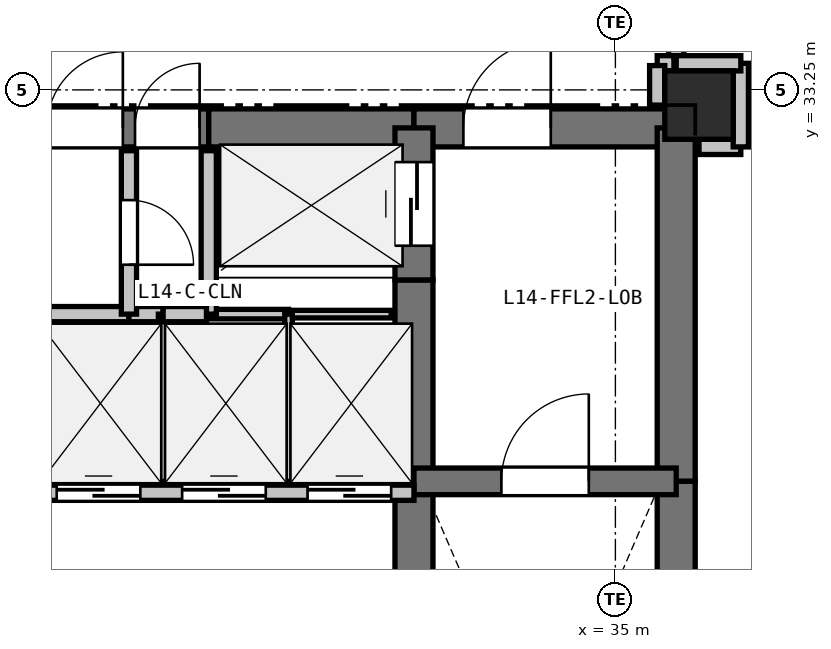
"""IFC4 building model, lengths in metres.
Left out: names, types, materials, properties, quantities, classifications, styles, units other than length and angle.
Written with IfcOpenShell. Run it as: python <this file> out.ifc"""

import sys

from ifc_helpers import new_model, si_unit, direction, frame, frame_2d, origin, origin_2d, place, context, subcontext, project, spatial, rectangle, extrude, element, fill, save


model = new_model("IFC4")
c1 = context("Model", 3, precision=1e-05, world=origin(), true_north=direction((0.0, 1.0)))
c2 = subcontext(c1, "Body", "Model", "MODEL_VIEW")
j1 = project(units=[si_unit("LENGTHUNIT", "METRE"), si_unit("PLANEANGLEUNIT", "RADIAN")], contexts=[c1])
p1 = place(None, origin())
s1 = spatial("IfcSite", under=j1, at=p1, CompositionType="ELEMENT")
p2 = place(p1, origin())
s2 = spatial("IfcBuilding", under=s1, at=p2, CompositionType="ELEMENT")
p3 = place(p2, frame((0.0, 0.0, 52.2)))
s3 = spatial("IfcBuildingStorey", under=s2, at=p3, CompositionType="ELEMENT", Elevation=52.2)
p4 = place(p3, frame((36.1, 33.05, 0.0), z_axis=(0.0, 0.0, 1.0), x_axis=(1.0, 0.0, 0.0)))
e1 = element("IfcColumn", 1, at=p4, inside=s3, PredefinedType="COLUMN", context=c2, shape_type="SweptSolid", body=[
    extrude(rectangle(XDim=0.9, YDim=0.9, at=origin_2d()), origin(), (0.0, 0.0, 1.0), 3.3),
])
p5 = place(p3, frame((27.4, 32.75, 0.0), z_axis=(0.0, 0.0, 1.0), x_axis=(1.0, 0.0, 0.0)))
e2 = element("IfcWall", 2, at=p5, inside=s3, PredefinedType="SHEAR", context=c2, shape_type="SweptSolid", body=[
    extrude(rectangle(XDim=2.25, YDim=0.5, at=frame_2d((1.125, 0.0))), origin(), (0.0, 0.0, 1.0), 3.04),
])
p6 = place(p5, frame((0.12, 0.0, 0.0)))
e3 = element("IfcOpeningElement", 3, at=p6, cuts=e2, PredefinedType="OPENING", context=c2, shape_type="SweptSolid", body=[
    extrude(rectangle(XDim=1.0, YDim=2.15, at=frame_2d((0.5, 1.075))), frame((0.0, 0.26, 0.0), z_axis=(0.0, -1.0, 0.0), x_axis=(1.0, 0.0, 0.0)), (0.0, 0.0, 1.0), 0.52),
])
p7 = place(p5, frame((1.28, 0.0, 0.0)))
e4 = element("IfcOpeningElement", 4, at=p7, cuts=e2, PredefinedType="OPENING", context=c2, shape_type="SweptSolid", body=[
    extrude(rectangle(XDim=0.85, YDim=2.1, at=frame_2d((0.425, 1.05))), frame((0.0, 0.26, 0.0), z_axis=(0.0, -1.0, 0.0), x_axis=(1.0, 0.0, 0.0)), (0.0, 0.0, 1.0), 0.52),
])
p8 = place(p3, frame((29.65, 32.75, 0.0), z_axis=(0.0, 0.0, 1.0), x_axis=(1.0, 0.0, 0.0)))
e5 = element("IfcWall", 5, at=p8, inside=s3, PredefinedType="SHEAR", context=c2, shape_type="SweptSolid", body=[
    extrude(rectangle(XDim=2.7, YDim=0.5, at=frame_2d((1.35, 0.0))), origin(), (0.0, 0.0, 1.0), 3.04),
])
p9 = place(p3, frame((32.35, 32.75, 0.0), z_axis=(0.0, 0.0, 1.0), x_axis=(1.0, 0.0, 0.0)))
e6 = element("IfcWall", 6, at=p9, inside=s3, PredefinedType="SHEAR", context=c2, shape_type="SweptSolid", body=[
    extrude(rectangle(XDim=3.45, YDim=0.5, at=frame_2d((1.725, 0.0))), origin(), (0.0, 0.0, 1.0), 3.04),
])
p10 = place(p9, frame((0.65, 0.0, 0.0)))
e7 = element("IfcOpeningElement", 7, at=p10, cuts=e6, PredefinedType="OPENING", context=c2, shape_type="SweptSolid", body=[
    extrude(rectangle(XDim=1.15, YDim=2.15, at=frame_2d((0.575, 1.075))), frame((0.0, 0.26, 0.0), z_axis=(0.0, -1.0, 0.0), x_axis=(1.0, 0.0, 0.0)), (0.0, 0.0, 1.0), 0.52),
])
p11 = place(p3, frame((35.8, 32.75, 0.0), z_axis=(0.0, 0.0, 1.0), x_axis=(0.0, -1.0, 0.0)))
e8 = element("IfcWall", 8, at=p11, inside=s3, PredefinedType="SHEAR", context=c2, shape_type="SweptSolid", body=[
    extrude(rectangle(XDim=4.65, YDim=0.5, at=frame_2d((2.325, 0.0))), origin(), (0.0, 0.0, 1.0), 3.04),
])
p12 = place(p3, frame((35.8, 28.1, 0.0), z_axis=(0.0, 0.0, 1.0), x_axis=(0.0, -1.0, 0.0)))
e9 = element("IfcWall", 9, at=p12, inside=s3, PredefinedType="SHEAR", context=c2, shape_type="SweptSolid", body=[
    extrude(rectangle(XDim=7.35, YDim=0.5, at=frame_2d((3.675, 0.0))), origin(), (0.0, 0.0, 1.0), 3.04),
])
p13 = place(p3, frame((32.35, 25.55, 0.0), z_axis=(0.0, 0.0, 1.0), x_axis=(0.0, 1.0, 0.0)))
e10 = element("IfcWall", 10, at=p13, inside=s3, PredefinedType="SHEAR", context=c2, shape_type="SweptSolid", body=[
    extrude(rectangle(XDim=2.4, YDim=0.5, at=frame_2d((1.2, 0.0))), origin(), (0.0, 0.0, 1.0), 3.04),
])
p14 = place(p3, frame((32.35, 27.95, 0.0), z_axis=(0.0, 0.0, 1.0), x_axis=(0.0, 1.0, 0.0)))
e11 = element("IfcWall", 11, at=p14, inside=s3, PredefinedType="SHEAR", context=c2, shape_type="SweptSolid", body=[
    extrude(rectangle(XDim=2.8, YDim=0.5, at=frame_2d((1.4, 0.0))), origin(), (0.0, 0.0, 1.0), 3.04),
])
p15 = place(p3, frame((32.35, 30.75, 0.0), z_axis=(0.0, 0.0, 1.0), x_axis=(0.0, 1.0, 0.0)))
e12 = element("IfcWall", 12, at=p15, inside=s3, PredefinedType="SHEAR", context=c2, shape_type="SweptSolid", body=[
    extrude(rectangle(XDim=2.0, YDim=0.5, at=frame_2d((1.0, 0.0))), origin(), (0.0, 0.0, 1.0), 3.04),
])
p16 = place(p15, frame((0.45, 0.0, 0.0)))
e13 = element("IfcOpeningElement", 13, at=p16, cuts=e12, PredefinedType="OPENING", context=c2, shape_type="SweptSolid", body=[
    extrude(rectangle(XDim=1.1, YDim=2.15, at=frame_2d((0.55, 1.075))), frame((0.0, 0.26, 0.0), z_axis=(0.0, -1.0, 0.0), x_axis=(1.0, 0.0, 0.0)), (0.0, 0.0, 1.0), 0.52),
])
p17 = place(p3, frame((32.35, 28.1, 0.0), z_axis=(0.0, 0.0, 1.0), x_axis=(1.0, 0.0, 0.0)))
e14 = element("IfcWall", 14, at=p17, inside=s3, PredefinedType="SHEAR", context=c2, shape_type="SweptSolid", body=[
    extrude(rectangle(XDim=3.45, YDim=0.35, at=frame_2d((1.725, 0.0))), origin(), (0.0, 0.0, 1.0), 3.04),
])
p18 = place(p17, frame((1.15, 0.0, 0.0)))
e15 = element("IfcOpeningElement", 15, at=p18, cuts=e14, PredefinedType="OPENING", context=c2, shape_type="SweptSolid", body=[
    extrude(rectangle(XDim=1.15, YDim=2.15, at=frame_2d((0.575, 1.075))), frame((0.0, 0.185, 0.0), z_axis=(0.0, -1.0, 0.0), x_axis=(1.0, 0.0, 0.0)), (0.0, 0.0, 1.0), 0.37),
])
p19 = place(p3, frame((27.4, 27.95, 0.0), z_axis=(0.0, 0.0, 1.0), x_axis=(1.0, 0.0, 0.0)))
e16 = element("IfcWall", 16, at=p19, inside=s3, PredefinedType="PARTITIONING", context=c2, shape_type="SweptSolid", body=[
    extrude(rectangle(XDim=4.95, YDim=0.2, at=frame_2d((2.475, 0.0))), origin(), (0.0, 0.0, 1.0), 3.04),
])
p20 = place(p19, frame((0.25, 0.0, 0.0)))
e17 = element("IfcOpeningElement", 17, at=p20, cuts=e16, PredefinedType="OPENING", context=c2, shape_type="SweptSolid", body=[
    extrude(rectangle(XDim=1.1, YDim=2.15, at=frame_2d((0.55, 1.075))), frame((0.0, 0.11, 0.0), z_axis=(0.0, -1.0, 0.0), x_axis=(1.0, 0.0, 0.0)), (0.0, 0.0, 1.0), 0.22),
])
p21 = place(p19, frame((1.9, 0.0, 0.0)))
e18 = element("IfcOpeningElement", 18, at=p21, cuts=e16, PredefinedType="OPENING", context=c2, shape_type="SweptSolid", body=[
    extrude(rectangle(XDim=1.1, YDim=2.15, at=frame_2d((0.55, 1.075))), frame((0.0, 0.11, 0.0), z_axis=(0.0, -1.0, 0.0), x_axis=(1.0, 0.0, 0.0)), (0.0, 0.0, 1.0), 0.22),
])
p22 = place(p19, frame((3.55, 0.0, 0.0)))
e19 = element("IfcOpeningElement", 19, at=p22, cuts=e16, PredefinedType="OPENING", context=c2, shape_type="SweptSolid", body=[
    extrude(rectangle(XDim=1.1, YDim=2.15, at=frame_2d((0.55, 1.075))), frame((0.0, 0.11, 0.0), z_axis=(0.0, -1.0, 0.0), x_axis=(1.0, 0.0, 0.0)), (0.0, 0.0, 1.0), 0.22),
])
p23 = place(p3, frame((32.05, 30.3, 0.0), z_axis=(0.0, 0.0, 1.0), x_axis=(-1.0, 0.0, 0.0)))
e20 = element("IfcWall", 20, at=p23, inside=s3, PredefinedType="PARTITIONING", context=c2, shape_type="SweptSolid", body=[
    extrude(rectangle(XDim=1.35, YDim=0.1, at=frame_2d((0.675, 0.0))), origin(), (0.0, 0.0, 1.0), 3.04),
])
p24 = place(p3, frame((30.7, 30.3, 0.0), z_axis=(0.0, 0.0, 1.0), x_axis=(-1.0, 0.0, 0.0)))
e21 = element("IfcWall", 21, at=p24, inside=s3, PredefinedType="PARTITIONING", context=c2, shape_type="SweptSolid", body=[
    extrude(rectangle(XDim=1.05, YDim=0.125, at=frame_2d((0.525, 0.0))), origin(), (0.0, 0.0, 1.0), 3.04),
])
p25 = place(p3, frame((29.65, 30.3, 0.0), z_axis=(0.0, 0.0, 1.0), x_axis=(0.0, 1.0, 0.0)))
e22 = element("IfcWall", 22, at=p25, inside=s3, PredefinedType="PARTITIONING", context=c2, shape_type="SweptSolid", body=[
    extrude(rectangle(XDim=2.15, YDim=0.2, at=frame_2d((1.075, 0.0))), origin(), (0.0, 0.0, 1.0), 3.04),
])
p26 = place(p3, frame((27.4, 30.3, 0.0), z_axis=(0.0, 0.0, 1.0), x_axis=(1.0, 0.0, 0.0)))
e23 = element("IfcWall", 23, at=p26, inside=s3, PredefinedType="PARTITIONING", context=c2, shape_type="SweptSolid", body=[
    extrude(rectangle(XDim=1.2, YDim=0.2, at=frame_2d((0.6, 0.0))), origin(), (0.0, 0.0, 1.0), 3.04),
])
p27 = place(p3, frame((28.6, 30.3, 0.0), z_axis=(0.0, 0.0, 1.0), x_axis=(1.0, 0.0, 0.0)))
e24 = element("IfcWall", 24, at=p27, inside=s3, PredefinedType="PARTITIONING", context=c2, shape_type="SweptSolid", body=[
    extrude(rectangle(XDim=0.45, YDim=0.2, at=frame_2d((0.225, 0.0))), origin(), (0.0, 0.0, 1.0), 3.04),
])
p28 = place(p3, frame((29.05, 30.3, 0.0), z_axis=(0.0, 0.0, 1.0), x_axis=(0.0, -1.0, 0.0)))
e25 = element("IfcWall", 25, at=p28, inside=s3, PredefinedType="PARTITIONING", context=c2, shape_type="SweptSolid", body=[
    extrude(rectangle(XDim=2.2, YDim=0.125, at=frame_2d((1.1, 0.0))), origin(), (0.0, 0.0, 1.0), 3.04),
])
p29 = place(p3, frame((29.05, 30.3, 0.0), z_axis=(0.0, 0.0, 1.0), x_axis=(1.0, 0.0, 0.0)))
e26 = element("IfcWall", 26, at=p29, inside=s3, PredefinedType="PARTITIONING", context=c2, shape_type="SweptSolid", body=[
    extrude(rectangle(XDim=0.57, YDim=0.2, at=frame_2d((0.285, 0.0))), origin(), (0.0, 0.0, 1.0), 3.04),
])
p30 = place(p3, frame((30.7, 30.3, 0.0), z_axis=(0.0, 0.0, 1.0), x_axis=(0.0, -1.0, 0.0)))
e27 = element("IfcWall", 27, at=p30, inside=s3, PredefinedType="PARTITIONING", context=c2, shape_type="SweptSolid", body=[
    extrude(rectangle(XDim=2.2, YDim=0.1, at=frame_2d((1.1, 0.0))), origin(), (0.0, 0.0, 1.0), 3.04),
])
p31 = place(p3, frame((28.6, 32.45, 0.0), z_axis=(0.0, 0.0, 1.0), x_axis=(0.0, -1.0, 0.0)))
e28 = element("IfcWall", 28, at=p31, inside=s3, PredefinedType="PARTITIONING", context=c2, shape_type="SweptSolid", body=[
    extrude(rectangle(XDim=2.15, YDim=0.2, at=frame_2d((1.075, 0.0))), origin(), (0.0, 0.0, 1.0), 3.04),
])
p32 = place(p31, frame((0.65, 0.0, 0.0)))
e29 = element("IfcOpeningElement", 29, at=p32, cuts=e28, PredefinedType="OPENING", context=c2, shape_type="SweptSolid", body=[
    extrude(rectangle(XDim=0.85, YDim=2.1, at=frame_2d((0.425, 1.05))), frame((0.0, 0.11, 0.0), z_axis=(0.0, -1.0, 0.0), x_axis=(1.0, 0.0, 0.0)), (0.0, 0.0, 1.0), 0.22),
])
p33 = place(p3, frame((35.8, 35.35, 0.0), z_axis=(0.0, 0.0, 1.0), x_axis=(0.0, -1.0, 0.0)))
e30 = element("IfcWall", 30, at=p33, inside=s3, PredefinedType="PARTITIONING", context=c2, shape_type="SweptSolid", body=[
    extrude(rectangle(XDim=1.75, YDim=0.2, at=frame_2d((0.875, 0.0))), origin(), (0.0, 0.0, 1.0), 3.04),
])
p34 = place(p33, frame((0.375, 0.0, 0.0)))
e31 = element("IfcOpeningElement", 31, at=p34, cuts=e30, PredefinedType="OPENING", context=c2, shape_type="SweptSolid", body=[
    extrude(rectangle(XDim=1.0, YDim=2.15, at=frame_2d((0.5, 1.075))), frame((0.0, 0.11, 0.0), z_axis=(0.0, -1.0, 0.0), x_axis=(1.0, 0.0, 0.0)), (0.0, 0.0, 1.0), 0.22),
])
p35 = place(p3, frame((35.77, 33.6, 0.0), z_axis=(0.0, 0.0, 1.0), x_axis=(-1.0, 0.0, 0.0)))
e32 = element("IfcWall", 32, at=p35, inside=s3, PredefinedType="PARTITIONING", context=c2, shape_type="SweptSolid", body=[
    extrude(rectangle(XDim=0.22, YDim=0.2, at=frame_2d((0.11, 0.0))), origin(), (0.0, 0.0, 1.0), 3.04),
])
p36 = place(p3, frame((35.55, 33.57, 0.0), z_axis=(0.0, 0.0, 1.0), x_axis=(0.0, -1.0, 0.0)))
e33 = element("IfcWall", 33, at=p36, inside=s3, PredefinedType="PARTITIONING", context=c2, shape_type="SweptSolid", body=[
    extrude(rectangle(XDim=0.52, YDim=0.2, at=frame_2d((0.26, 0.0))), origin(), (0.0, 0.0, 1.0), 2.488),
])
p37 = place(p3, frame((36.1, 32.5, 0.0), z_axis=(0.0, 0.0, 1.0), x_axis=(1.0, 0.0, 0.0)))
e34 = element("IfcWall", 34, at=p37, inside=s3, PredefinedType="PARTITIONING", context=c2, shape_type="SweptSolid", body=[
    extrude(rectangle(XDim=0.55, YDim=0.2, at=frame_2d((0.275, 0.0))), origin(), (0.0, 0.0, 1.0), 2.488),
])
p38 = place(p3, frame((36.65, 32.5, 0.0), z_axis=(0.0, 0.0, 1.0), x_axis=(0.0, 1.0, 0.0)))
e35 = element("IfcWall", 35, at=p38, inside=s3, PredefinedType="PARTITIONING", context=c2, shape_type="SweptSolid", body=[
    extrude(rectangle(XDim=1.1, YDim=0.2, at=frame_2d((0.55, 0.0))), origin(), (0.0, 0.0, 1.0), 2.338),
])
p39 = place(p3, frame((36.65, 33.6, 0.0), z_axis=(0.0, 0.0, 1.0), x_axis=(-1.0, 0.0, 0.0)))
e36 = element("IfcWall", 36, at=p39, inside=s3, PredefinedType="PARTITIONING", context=c2, shape_type="SweptSolid", body=[
    extrude(rectangle(XDim=0.85, YDim=0.2, at=frame_2d((0.425, 0.0))), origin(), (0.0, 0.0, 1.0), 2.338),
])
p40 = place(p20, origin())
e37 = element("IfcDoor", 37, at=p40, inside=s3, OperationType="SLIDING_TO_LEFT", PredefinedType="DOOR", context=c2, shape_type="SweptSolid", body=[
    extrude(rectangle(XDim=1.1, YDim=2.15, at=frame_2d((0.55, 1.075))), frame((0.0, 0.025, 0.0), z_axis=(0.0, -1.0, 0.0), x_axis=(1.0, 0.0, 0.0)), (0.0, 0.0, 1.0), 0.05),
])
fill(e17, e37)
p41 = place(p21, origin())
e38 = element("IfcDoor", 38, at=p41, inside=s3, OperationType="SLIDING_TO_LEFT", PredefinedType="DOOR", context=c2, shape_type="SweptSolid", body=[
    extrude(rectangle(XDim=1.1, YDim=2.15, at=frame_2d((0.55, 1.075))), frame((0.0, 0.025, 0.0), z_axis=(0.0, -1.0, 0.0), x_axis=(1.0, 0.0, 0.0)), (0.0, 0.0, 1.0), 0.05),
])
fill(e18, e38)
p42 = place(p22, origin())
e39 = element("IfcDoor", 39, at=p42, inside=s3, OperationType="SLIDING_TO_LEFT", PredefinedType="DOOR", context=c2, shape_type="SweptSolid", body=[
    extrude(rectangle(XDim=1.1, YDim=2.15, at=frame_2d((0.55, 1.075))), frame((0.0, 0.025, 0.0), z_axis=(0.0, -1.0, 0.0), x_axis=(1.0, 0.0, 0.0)), (0.0, 0.0, 1.0), 0.05),
])
fill(e19, e39)
p43 = place(p16, origin())
e40 = element("IfcDoor", 40, at=p43, inside=s3, OperationType="SLIDING_TO_LEFT", PredefinedType="DOOR", context=c2, shape_type="SweptSolid", body=[
    extrude(rectangle(XDim=1.1, YDim=2.15, at=frame_2d((0.55, 1.075))), frame((0.0, 0.025, 0.0), z_axis=(0.0, -1.0, 0.0), x_axis=(1.0, 0.0, 0.0)), (0.0, 0.0, 1.0), 0.05),
])
fill(e13, e40)
p44 = place(p18, origin())
e41 = element("IfcDoor", 41, at=p44, inside=s3, OperationType="SINGLE_SWING_RIGHT", PredefinedType="DOOR", context=c2, shape_type="SweptSolid", body=[
    extrude(rectangle(XDim=1.15, YDim=2.15, at=frame_2d((0.575, 1.075))), frame((0.0, 0.025, 0.0), z_axis=(0.0, -1.0, 0.0), x_axis=(1.0, 0.0, 0.0)), (0.0, 0.0, 1.0), 0.05),
])
fill(e15, e41)
p45 = place(p10, origin())
e42 = element("IfcDoor", 42, at=p45, inside=s3, OperationType="SINGLE_SWING_RIGHT", PredefinedType="DOOR", context=c2, shape_type="SweptSolid", body=[
    extrude(rectangle(XDim=1.15, YDim=2.15, at=frame_2d((0.575, 1.075))), frame((0.0, 0.025, 0.0), z_axis=(0.0, -1.0, 0.0), x_axis=(1.0, 0.0, 0.0)), (0.0, 0.0, 1.0), 0.05),
])
fill(e7, e42)
p46 = place(p6, origin())
e43 = element("IfcDoor", 43, at=p46, inside=s3, OperationType="SINGLE_SWING_RIGHT", PredefinedType="DOOR", context=c2, shape_type="SweptSolid", body=[
    extrude(rectangle(XDim=1.0, YDim=2.15, at=frame_2d((0.5, 1.075))), frame((0.0, 0.025, 0.0), z_axis=(0.0, -1.0, 0.0), x_axis=(1.0, 0.0, 0.0)), (0.0, 0.0, 1.0), 0.05),
])
fill(e3, e43)
p47 = place(p32, origin())
e44 = element("IfcDoor", 44, at=p47, inside=s3, OperationType="SINGLE_SWING_RIGHT", PredefinedType="DOOR", context=c2, shape_type="SweptSolid", body=[
    extrude(rectangle(XDim=0.85, YDim=2.1, at=frame_2d((0.425, 1.05))), frame((0.0, 0.025, 0.0), z_axis=(0.0, -1.0, 0.0), x_axis=(1.0, 0.0, 0.0)), (0.0, 0.0, 1.0), 0.05),
])
fill(e29, e44)
p48 = place(p7, origin())
e45 = element("IfcDoor", 45, at=p48, inside=s3, OperationType="SINGLE_SWING_RIGHT", PredefinedType="DOOR", context=c2, shape_type="SweptSolid", body=[
    extrude(rectangle(XDim=0.85, YDim=2.1, at=frame_2d((0.425, 1.05))), frame((0.0, 0.025, 0.0), z_axis=(0.0, -1.0, 0.0), x_axis=(1.0, 0.0, 0.0)), (0.0, 0.0, 1.0), 0.05),
])
fill(e4, e45)
save(model, sys.argv[1])
